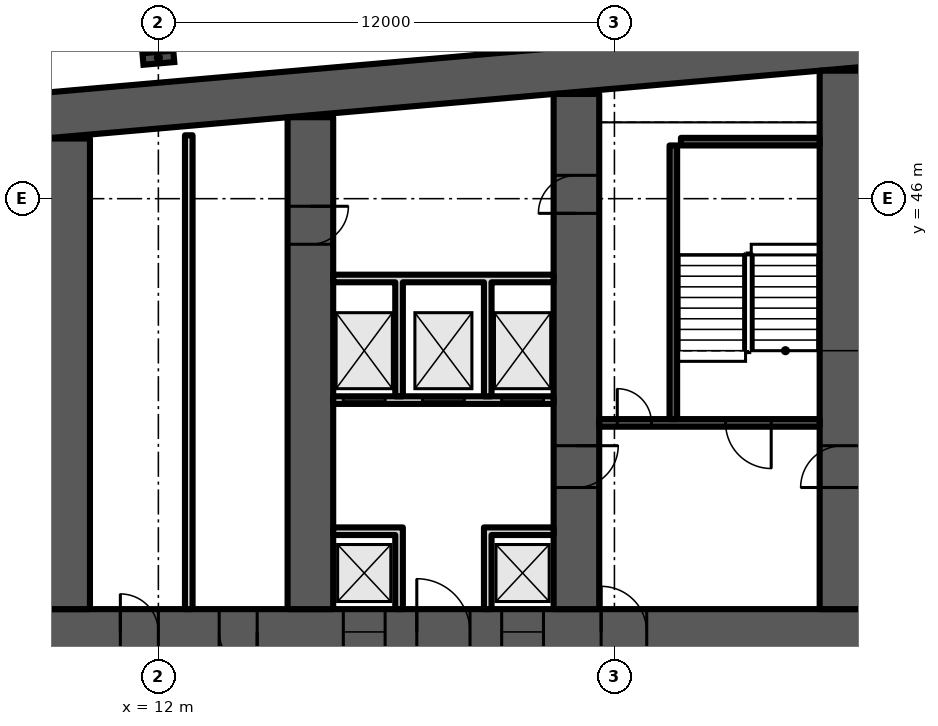
"""IFC4 building model, lengths in metres.
Left out: names, types, materials, properties, quantities, classifications, styles, units other than length and angle.
Written with IfcOpenShell. Run it as: python <this file> out.ifc"""

import sys

from ifc_helpers import new_model, si_unit, direction, frame, frame_2d, origin, origin_2d, place, context, subcontext, project, spatial, polyline, rectangle, i_section, outline, extrude, element, fill, save


model = new_model("IFC4")
c1 = context("Model", 3, precision=1e-05, world=origin(), true_north=direction((0.0, 1.0)))
c2 = subcontext(c1, "Body", "Model", "MODEL_VIEW")
j1 = project(units=[si_unit("LENGTHUNIT", "METRE"), si_unit("PLANEANGLEUNIT", "RADIAN")], contexts=[c1])
p1 = place(None, origin())
s1 = spatial("IfcSite", under=j1, at=p1, CompositionType="ELEMENT")
p2 = place(p1, origin())
s2 = spatial("IfcBuilding", under=s1, at=p2, CompositionType="ELEMENT")
p3 = place(p2, frame((0.0, 0.0, 88.3)))
s3 = spatial("IfcBuildingStorey", under=s2, at=p3, CompositionType="ELEMENT", Elevation=88.3)
p4 = place(p3, frame((0.0, 0.0, -0.0)))
e1 = element("IfcWall", 1, at=p4, inside=s3, PredefinedType="SHEAR", context=c2, shape_type="SweptSolid", body=[
    extrude(outline(polyline([(9.0, 47.583), (37.0, 50.032), (65.0, 47.583), (65.0, 48.787), (37.0, 51.237), (9.0, 48.787), (9.0, 47.583)])), origin(), (0.0, 0.0, 1.0), 3.6),
])
p5 = place(p3, frame((9.0, 34.6, 0.0), z_axis=(0.0, 0.0, 1.0), x_axis=(1.0, 0.0, 0.0)))
e2 = element("IfcWall", 2, at=p5, inside=s3, PredefinedType="SHEAR", context=c2, shape_type="SweptSolid", body=[
    extrude(rectangle(XDim=56.0, YDim=1.2, at=frame_2d((28.0, 0.0))), origin(), (0.0, 0.0, 1.0), 3.6),
])
p6 = place(p5, frame((2.0, 0.0, 0.0)))
e3 = element("IfcOpeningElement", 3, at=p6, cuts=e2, PredefinedType="OPENING", context=c2, shape_type="SweptSolid", body=[
    extrude(rectangle(XDim=1.0, YDim=2.1, at=frame_2d((0.5, 1.05))), frame((0.0, 0.61, 0.0), z_axis=(0.0, -1.0, 0.0), x_axis=(1.0, 0.0, 0.0)), (0.0, 0.0, 1.0), 1.22),
])
p7 = place(p5, frame((4.6, 0.0, 0.0)))
e4 = element("IfcOpeningElement", 4, at=p7, cuts=e2, PredefinedType="OPENING", context=c2, shape_type="SweptSolid", body=[
    extrude(rectangle(XDim=1.0, YDim=2.1, at=frame_2d((0.5, 1.05))), frame((0.0, 0.61, 0.0), z_axis=(0.0, -1.0, 0.0), x_axis=(1.0, 0.0, 0.0)), (0.0, 0.0, 1.0), 1.22),
])
p8 = place(p5, frame((7.867, 0.0, 0.0)))
e5 = element("IfcOpeningElement", 5, at=p8, cuts=e2, PredefinedType="OPENING", context=c2, shape_type="SweptSolid", body=[
    extrude(rectangle(XDim=1.1, YDim=2.1, at=frame_2d((0.55, 1.05))), frame((0.0, 0.61, 0.0), z_axis=(0.0, -1.0, 0.0), x_axis=(1.0, 0.0, 0.0)), (0.0, 0.0, 1.0), 1.22),
])
p9 = place(p5, frame((12.033, 0.0, 0.0)))
e6 = element("IfcOpeningElement", 6, at=p9, cuts=e2, PredefinedType="OPENING", context=c2, shape_type="SweptSolid", body=[
    extrude(rectangle(XDim=1.1, YDim=2.1, at=frame_2d((0.55, 1.05))), frame((0.0, 0.61, 0.0), z_axis=(0.0, -1.0, 0.0), x_axis=(1.0, 0.0, 0.0)), (0.0, 0.0, 1.0), 1.22),
])
p10 = place(p5, frame((9.8, 0.0, 0.0)))
e7 = element("IfcOpeningElement", 7, at=p10, cuts=e2, PredefinedType="OPENING", context=c2, shape_type="SweptSolid", body=[
    extrude(rectangle(XDim=1.4, YDim=2.1, at=frame_2d((0.7, 1.05))), frame((0.0, 0.61, 0.0), z_axis=(0.0, -1.0, 0.0), x_axis=(1.0, 0.0, 0.0)), (0.0, 0.0, 1.0), 1.22),
])
p11 = place(p5, frame((14.65, 0.0, 0.0)))
e8 = element("IfcOpeningElement", 8, at=p11, cuts=e2, PredefinedType="OPENING", context=c2, shape_type="SweptSolid", body=[
    extrude(rectangle(XDim=1.2, YDim=2.1, at=frame_2d((0.6, 1.05))), frame((0.0, 0.61, 0.0), z_axis=(0.0, -1.0, 0.0), x_axis=(1.0, 0.0, 0.0)), (0.0, 0.0, 1.0), 1.22),
])
p12 = place(p5, frame((21.867, 0.0, 0.0)))
e9 = element("IfcOpeningElement", 9, at=p12, cuts=e2, PredefinedType="OPENING", context=c2, shape_type="SweptSolid", body=[
    extrude(rectangle(XDim=1.1, YDim=2.1, at=frame_2d((0.55, 1.05))), frame((0.0, 0.61, 0.0), z_axis=(0.0, -1.0, 0.0), x_axis=(1.0, 0.0, 0.0)), (0.0, 0.0, 1.0), 1.22),
])
p13 = place(p5, frame((26.033, 0.0, 0.0)))
e10 = element("IfcOpeningElement", 10, at=p13, cuts=e2, PredefinedType="OPENING", context=c2, shape_type="SweptSolid", body=[
    extrude(rectangle(XDim=1.1, YDim=2.1, at=frame_2d((0.55, 1.05))), frame((0.0, 0.61, 0.0), z_axis=(0.0, -1.0, 0.0), x_axis=(1.0, 0.0, 0.0)), (0.0, 0.0, 1.0), 1.22),
])
p14 = place(p5, frame((23.8, 0.0, 0.0)))
e11 = element("IfcOpeningElement", 11, at=p14, cuts=e2, PredefinedType="OPENING", context=c2, shape_type="SweptSolid", body=[
    extrude(rectangle(XDim=1.4, YDim=2.1, at=frame_2d((0.7, 1.05))), frame((0.0, 0.61, 0.0), z_axis=(0.0, -1.0, 0.0), x_axis=(1.0, 0.0, 0.0)), (0.0, 0.0, 1.0), 1.22),
])
p15 = place(p5, frame((28.867, 0.0, 0.0)))
e12 = element("IfcOpeningElement", 12, at=p15, cuts=e2, PredefinedType="OPENING", context=c2, shape_type="SweptSolid", body=[
    extrude(rectangle(XDim=1.1, YDim=2.1, at=frame_2d((0.55, 1.05))), frame((0.0, 0.61, 0.0), z_axis=(0.0, -1.0, 0.0), x_axis=(1.0, 0.0, 0.0)), (0.0, 0.0, 1.0), 1.22),
])
p16 = place(p5, frame((33.033, 0.0, 0.0)))
e13 = element("IfcOpeningElement", 13, at=p16, cuts=e2, PredefinedType="OPENING", context=c2, shape_type="SweptSolid", body=[
    extrude(rectangle(XDim=1.1, YDim=2.1, at=frame_2d((0.55, 1.05))), frame((0.0, 0.61, 0.0), z_axis=(0.0, -1.0, 0.0), x_axis=(1.0, 0.0, 0.0)), (0.0, 0.0, 1.0), 1.22),
])
p17 = place(p5, frame((40.15, 0.0, 0.0)))
e14 = element("IfcOpeningElement", 14, at=p17, cuts=e2, PredefinedType="OPENING", context=c2, shape_type="SweptSolid", body=[
    extrude(rectangle(XDim=1.2, YDim=2.1, at=frame_2d((0.6, 1.05))), frame((0.0, 0.61, 0.0), z_axis=(0.0, -1.0, 0.0), x_axis=(1.0, 0.0, 0.0)), (0.0, 0.0, 1.0), 1.22),
])
p18 = place(p5, frame((44.8, 0.0, 0.0)))
e15 = element("IfcOpeningElement", 15, at=p18, cuts=e2, PredefinedType="OPENING", context=c2, shape_type="SweptSolid", body=[
    extrude(rectangle(XDim=1.4, YDim=2.1, at=frame_2d((0.7, 1.05))), frame((0.0, 0.61, 0.0), z_axis=(0.0, -1.0, 0.0), x_axis=(1.0, 0.0, 0.0)), (0.0, 0.0, 1.0), 1.22),
])
p19 = place(p5, frame((49.867, 0.0, 0.0)))
e16 = element("IfcOpeningElement", 16, at=p19, cuts=e2, PredefinedType="OPENING", context=c2, shape_type="SweptSolid", body=[
    extrude(rectangle(XDim=1.1, YDim=2.1, at=frame_2d((0.55, 1.05))), frame((0.0, 0.61, 0.0), z_axis=(0.0, -1.0, 0.0), x_axis=(1.0, 0.0, 0.0)), (0.0, 0.0, 1.0), 1.22),
])
p20 = place(p5, frame((53.5, 0.0, 0.0)))
e17 = element("IfcOpeningElement", 17, at=p20, cuts=e2, PredefinedType="OPENING", context=c2, shape_type="SweptSolid", body=[
    extrude(rectangle(XDim=1.1, YDim=2.1, at=frame_2d((0.55, 1.05))), frame((0.0, 0.61, 0.0), z_axis=(0.0, -1.0, 0.0), x_axis=(1.0, 0.0, 0.0)), (0.0, 0.0, 1.0), 1.22),
])
p21 = place(p5, frame((51.567, 0.0, 0.0)))
e18 = element("IfcOpeningElement", 18, at=p21, cuts=e2, PredefinedType="OPENING", context=c2, shape_type="SweptSolid", body=[
    extrude(rectangle(XDim=1.4, YDim=2.1, at=frame_2d((0.7, 1.05))), frame((0.0, 0.61, 0.0), z_axis=(0.0, -1.0, 0.0), x_axis=(1.0, 0.0, 0.0)), (0.0, 0.0, 1.0), 1.22),
])
p22 = place(p3, frame((9.6, 35.2, 0.0), z_axis=(0.0, 0.0, 1.0), x_axis=(0.0, 1.0, 0.0)))
e19 = element("IfcWall", 19, at=p22, inside=s3, PredefinedType="SHEAR", context=c2, shape_type="SweptSolid", body=[
    extrude(rectangle(XDim=12.383, YDim=1.2, at=frame_2d((6.191, 0.0))), origin(), (0.0, 0.0, 1.0), 3.6),
])
p23 = place(p3, frame((16.0, 35.2, 0.0), z_axis=(0.0, 0.0, 1.0), x_axis=(0.0, 1.0, 0.0)))
e20 = element("IfcWall", 20, at=p23, inside=s3, PredefinedType="SHEAR", context=c2, shape_type="SweptSolid", body=[
    extrude(rectangle(XDim=12.943, YDim=1.2, at=frame_2d((6.471, 0.0))), origin(), (0.0, 0.0, 1.0), 3.6),
])
p24 = place(p23, frame((9.6, 0.0, 0.0)))
e21 = element("IfcOpeningElement", 21, at=p24, cuts=e20, PredefinedType="OPENING", context=c2, shape_type="SweptSolid", body=[
    extrude(rectangle(XDim=1.0, YDim=2.1, at=frame_2d((0.5, 1.05))), frame((0.0, 0.61, 0.0), z_axis=(0.0, -1.0, 0.0), x_axis=(1.0, 0.0, 0.0)), (0.0, 0.0, 1.0), 1.22),
])
p25 = place(p3, frame((23.0, 35.2, 0.0), z_axis=(0.0, 0.0, 1.0), x_axis=(0.0, 1.0, 0.0)))
e22 = element("IfcWall", 22, at=p25, inside=s3, PredefinedType="SHEAR", context=c2, shape_type="SweptSolid", body=[
    extrude(rectangle(XDim=13.555, YDim=1.2, at=frame_2d((6.778, 0.0))), origin(), (0.0, 0.0, 1.0), 3.6),
])
p26 = place(p25, frame((10.414, 0.0, 0.0)))
e23 = element("IfcOpeningElement", 23, at=p26, cuts=e22, PredefinedType="OPENING", context=c2, shape_type="SweptSolid", body=[
    extrude(rectangle(XDim=1.0, YDim=2.1, at=frame_2d((0.5, 1.05))), frame((0.0, 0.61, 0.0), z_axis=(0.0, -1.0, 0.0), x_axis=(1.0, 0.0, 0.0)), (0.0, 0.0, 1.0), 1.22),
])
p27 = place(p25, frame((3.2, 0.0, 0.0)))
e24 = element("IfcOpeningElement", 24, at=p27, cuts=e22, PredefinedType="OPENING", context=c2, shape_type="SweptSolid", body=[
    extrude(rectangle(XDim=1.1, YDim=2.1, at=frame_2d((0.55, 1.05))), frame((0.0, 0.61, 0.0), z_axis=(0.0, -1.0, 0.0), x_axis=(1.0, 0.0, 0.0)), (0.0, 0.0, 1.0), 1.22),
])
p28 = place(p3, frame((30.0, 35.2, 0.0), z_axis=(0.0, 0.0, 1.0), x_axis=(0.0, 1.0, 0.0)))
e25 = element("IfcWall", 25, at=p28, inside=s3, PredefinedType="SHEAR", context=c2, shape_type="SweptSolid", body=[
    extrude(rectangle(XDim=14.168, YDim=1.2, at=frame_2d((7.084, 0.0))), origin(), (0.0, 0.0, 1.0), 3.6),
])
p29 = place(p28, frame((3.2, 0.0, 0.0)))
e26 = element("IfcOpeningElement", 26, at=p29, cuts=e25, PredefinedType="OPENING", context=c2, shape_type="SweptSolid", body=[
    extrude(rectangle(XDim=1.1, YDim=2.1, at=frame_2d((0.55, 1.05))), frame((0.0, 0.61, 0.0), z_axis=(0.0, -1.0, 0.0), x_axis=(1.0, 0.0, 0.0)), (0.0, 0.0, 1.0), 1.22),
])
p30 = place(p3, frame((12.0, 49.71, 0.0), z_axis=(0.0, 0.0, 1.0), x_axis=(-0.087156, 0.996197, 0.0)))
e27 = element("IfcColumn", 27, at=p30, inside=s3, PredefinedType="COLUMN", context=c2, shape_type="SweptSolid", body=[
    extrude(i_section(OverallWidth=0.303, OverallDepth=0.814, WebThickness=0.021, FlangeThickness=0.04, FilletRadius=0.03, at=origin_2d()), origin(), (0.0, 0.0, 1.0), 3.6),
])
p31 = place(p3, frame((12.8, 35.2, 0.0), z_axis=(0.0, 0.0, 1.0), x_axis=(0.0, 1.0, 0.0)))
e28 = element("IfcWall", 28, at=p31, inside=s3, PredefinedType="PARTITIONING", context=c2, shape_type="SweptSolid", body=[
    extrude(rectangle(XDim=12.468, YDim=0.2, at=frame_2d((6.234, 0.0))), origin(), (0.0, 0.0, 1.0), 3.15),
])
p32 = place(p3, frame((16.6, 40.7, 0.0), z_axis=(0.0, 0.0, 1.0), x_axis=(1.0, 0.0, 0.0)))
e29 = element("IfcWall", 29, at=p32, inside=s3, PredefinedType="PARTITIONING", context=c2, shape_type="SweptSolid", body=[
    extrude(rectangle(XDim=5.8, YDim=0.2, at=frame_2d((2.9, 0.0))), origin(), (0.0, 0.0, 1.0), 3.15),
])
p33 = place(p32, frame((0.267, 0.0, 0.0)))
e30 = element("IfcOpeningElement", 30, at=p33, cuts=e29, PredefinedType="OPENING", context=c2, shape_type="SweptSolid", body=[
    extrude(rectangle(XDim=1.1, YDim=2.1, at=frame_2d((0.55, 1.05))), frame((0.0, 0.11, 0.0), z_axis=(0.0, -1.0, 0.0), x_axis=(1.0, 0.0, 0.0)), (0.0, 0.0, 1.0), 0.22),
])
p34 = place(p32, frame((2.35, 0.0, 0.0)))
e31 = element("IfcOpeningElement", 31, at=p34, cuts=e29, PredefinedType="OPENING", context=c2, shape_type="SweptSolid", body=[
    extrude(rectangle(XDim=1.1, YDim=2.1, at=frame_2d((0.55, 1.05))), frame((0.0, 0.11, 0.0), z_axis=(0.0, -1.0, 0.0), x_axis=(1.0, 0.0, 0.0)), (0.0, 0.0, 1.0), 0.22),
])
p35 = place(p32, frame((4.433, 0.0, 0.0)))
e32 = element("IfcOpeningElement", 32, at=p35, cuts=e29, PredefinedType="OPENING", context=c2, shape_type="SweptSolid", body=[
    extrude(rectangle(XDim=1.1, YDim=2.1, at=frame_2d((0.55, 1.05))), frame((0.0, 0.11, 0.0), z_axis=(0.0, -1.0, 0.0), x_axis=(1.0, 0.0, 0.0)), (0.0, 0.0, 1.0), 0.22),
])
p36 = place(p3, frame((0.0, 0.0, -0.0)))
e33 = element("IfcWall", 33, at=p36, inside=s3, PredefinedType="PARTITIONING", context=c2, shape_type="SweptSolid", body=[
    extrude(outline(polyline([(18.233, 37.15), (16.6, 37.15), (16.6, 37.35), (18.233, 37.35), (18.433, 37.35), (18.433, 35.2), (18.233, 35.2), (18.233, 37.15)])), origin(), (0.0, 0.0, 1.0), 3.15),
])
p37 = place(p3, frame((0.0, 0.0, -0.0)))
e34 = element("IfcWall", 34, at=p37, inside=s3, PredefinedType="PARTITIONING", context=c2, shape_type="SweptSolid", body=[
    extrude(outline(polyline([(20.567, 37.35), (20.767, 37.35), (22.4, 37.35), (22.4, 37.15), (20.767, 37.15), (20.767, 35.2), (20.567, 35.2), (20.567, 37.35)])), origin(), (0.0, 0.0, 1.0), 3.15),
])
p38 = place(p3, frame((0.0, 0.0, -0.0)))
e35 = element("IfcWall", 35, at=p38, inside=s3, PredefinedType="PARTITIONING", context=c2, shape_type="SweptSolid", body=[
    extrude(outline(polyline([(18.433, 40.8), (18.233, 40.8), (18.233, 43.8), (16.6, 43.8), (16.6, 44.0), (22.4, 44.0), (22.4, 43.8), (20.767, 43.8), (20.767, 40.8), (20.567, 40.8), (20.567, 43.8), (18.433, 43.8), (18.433, 40.8)])), origin(), (0.0, 0.0, 1.0), 3.15),
])
p39 = place(p3, frame((23.6, 40.1, 0.0), z_axis=(0.0, 0.0, 1.0), x_axis=(1.0, 0.0, 0.0)))
e36 = element("IfcWall", 36, at=p39, inside=s3, PredefinedType="SHEAR", context=c2, shape_type="SweptSolid", body=[
    extrude(rectangle(XDim=5.8, YDim=0.2, at=frame_2d((2.9, 0.0))), origin(), (0.0, 0.0, 1.0), 3.15),
])
p40 = place(p39, frame((3.325, 0.0, 0.0)))
e37 = element("IfcOpeningElement", 37, at=p40, cuts=e36, PredefinedType="OPENING", context=c2, shape_type="SweptSolid", body=[
    extrude(rectangle(XDim=1.2, YDim=2.1, at=frame_2d((0.6, 1.05))), frame((0.0, 0.11, 0.0), z_axis=(0.0, -1.0, 0.0), x_axis=(1.0, 0.0, 0.0)), (0.0, 0.0, 1.0), 0.22),
])
p41 = place(p39, frame((0.475, 0.0, 0.0)))
e38 = element("IfcOpeningElement", 38, at=p41, cuts=e36, PredefinedType="OPENING", context=c2, shape_type="SweptSolid", body=[
    extrude(rectangle(XDim=0.9, YDim=2.1, at=frame_2d((0.45, 1.05))), frame((0.0, 0.11, 0.0), z_axis=(0.0, -1.0, 0.0), x_axis=(1.0, 0.0, 0.0)), (0.0, 0.0, 1.0), 0.22),
])
p42 = place(p3, frame((25.55, 40.2, 0.0), z_axis=(0.0, 0.0, 1.0), x_axis=(0.0, 1.0, 0.0)))
e39 = element("IfcWall", 39, at=p42, inside=s3, PredefinedType="SHEAR", context=c2, shape_type="SweptSolid", body=[
    extrude(rectangle(XDim=7.2, YDim=0.2, at=frame_2d((3.6, 0.0))), origin(), (0.0, 0.0, 1.0), 3.15),
])
p43 = place(p3, frame((25.75, 47.5, 0.0), z_axis=(0.0, 0.0, 1.0), x_axis=(1.0, 0.0, 0.0)))
e40 = element("IfcWall", 40, at=p43, inside=s3, PredefinedType="SHEAR", context=c2, shape_type="SweptSolid", body=[
    extrude(rectangle(XDim=3.65, YDim=0.2, at=frame_2d((1.825, 0.0))), origin(), (0.0, 0.0, 1.0), 3.15),
])
p44 = place(p6, origin())
e41 = element("IfcDoor", 41, at=p44, inside=s3, OperationType="SINGLE_SWING_LEFT", PredefinedType="DOOR", context=c2, shape_type="SweptSolid", body=[
    extrude(rectangle(XDim=1.0, YDim=2.1, at=frame_2d((0.5, 1.05))), frame((0.0, 0.6, 0.0), z_axis=(0.0, -1.0, 0.0), x_axis=(1.0, 0.0, 0.0)), (0.0, 0.0, 1.0), 1.199),
])
fill(e3, e41)
p45 = place(p7, origin())
e42 = element("IfcDoor", 42, at=p45, inside=s3, OperationType="SINGLE_SWING_RIGHT", PredefinedType="DOOR", context=c2, shape_type="SweptSolid", body=[
    extrude(rectangle(XDim=1.0, YDim=2.1, at=frame_2d((0.5, 1.05))), frame((0.0, 0.6, 0.0), z_axis=(0.0, -1.0, 0.0), x_axis=(1.0, 0.0, 0.0)), (0.0, 0.0, 1.0), 1.199),
])
fill(e4, e42)
p46 = place(p8, origin())
e43 = element("IfcDoor", 43, at=p46, inside=s3, OperationType="DOUBLE_DOOR_SLIDING", PredefinedType="DOOR", context=c2, shape_type="SweptSolid", body=[
    extrude(rectangle(XDim=1.1, YDim=2.1, at=frame_2d((0.55, 1.05))), frame((0.0, 0.025, 0.0), z_axis=(0.0, -1.0, 0.0), x_axis=(1.0, 0.0, 0.0)), (0.0, 0.0, 1.0), 0.05),
])
fill(e5, e43)
p47 = place(p9, origin())
e44 = element("IfcDoor", 44, at=p47, inside=s3, OperationType="DOUBLE_DOOR_SLIDING", PredefinedType="DOOR", context=c2, shape_type="SweptSolid", body=[
    extrude(rectangle(XDim=1.1, YDim=2.1, at=frame_2d((0.55, 1.05))), frame((0.0, 0.025, 0.0), z_axis=(0.0, -1.0, 0.0), x_axis=(1.0, 0.0, 0.0)), (0.0, 0.0, 1.0), 0.05),
])
fill(e6, e44)
p48 = place(p10, origin())
e45 = element("IfcDoor", 45, at=p48, inside=s3, OperationType="DOUBLE_DOOR_SINGLE_SWING", PredefinedType="DOOR", context=c2, shape_type="SweptSolid", body=[
    extrude(rectangle(XDim=1.4, YDim=2.1, at=frame_2d((0.7, 1.05))), frame((0.0, 0.025, 0.0), z_axis=(0.0, -1.0, 0.0), x_axis=(1.0, 0.0, 0.0)), (0.0, 0.0, 1.0), 0.05),
])
fill(e7, e45)
p49 = place(p33, origin())
e46 = element("IfcDoor", 46, at=p49, inside=s3, OperationType="DOUBLE_DOOR_SLIDING", PredefinedType="DOOR", context=c2, shape_type="SweptSolid", body=[
    extrude(rectangle(XDim=1.1, YDim=2.1, at=frame_2d((0.55, 1.05))), frame((0.0, 0.025, 0.0), z_axis=(0.0, -1.0, 0.0), x_axis=(1.0, 0.0, 0.0)), (0.0, 0.0, 1.0), 0.05),
])
fill(e30, e46)
p50 = place(p34, origin())
e47 = element("IfcDoor", 47, at=p50, inside=s3, OperationType="DOUBLE_DOOR_SLIDING", PredefinedType="DOOR", context=c2, shape_type="SweptSolid", body=[
    extrude(rectangle(XDim=1.1, YDim=2.1, at=frame_2d((0.55, 1.05))), frame((0.0, 0.025, 0.0), z_axis=(0.0, -1.0, 0.0), x_axis=(1.0, 0.0, 0.0)), (0.0, 0.0, 1.0), 0.05),
])
fill(e31, e47)
p51 = place(p35, origin())
e48 = element("IfcDoor", 48, at=p51, inside=s3, OperationType="DOUBLE_DOOR_SLIDING", PredefinedType="DOOR", context=c2, shape_type="SweptSolid", body=[
    extrude(rectangle(XDim=1.1, YDim=2.1, at=frame_2d((0.55, 1.05))), frame((0.0, 0.025, 0.0), z_axis=(0.0, -1.0, 0.0), x_axis=(1.0, 0.0, 0.0)), (0.0, 0.0, 1.0), 0.05),
])
fill(e32, e48)
p52 = place(p26, origin())
e49 = element("IfcDoor", 49, at=p52, inside=s3, OperationType="SINGLE_SWING_LEFT", PredefinedType="DOOR", context=c2, shape_type="SweptSolid", body=[
    extrude(rectangle(XDim=1.0, YDim=2.1, at=frame_2d((0.5, 1.05))), frame((0.0, 0.6, 0.0), z_axis=(0.0, -1.0, 0.0), x_axis=(1.0, 0.0, 0.0)), (0.0, 0.0, 1.0), 1.199),
])
fill(e23, e49)
p53 = place(p40, origin())
e50 = element("IfcDoor", 50, at=p53, inside=s3, OperationType="SINGLE_SWING_RIGHT", PredefinedType="DOOR", context=c2, shape_type="SweptSolid", body=[
    extrude(rectangle(XDim=1.2, YDim=2.1, at=frame_2d((0.6, 1.05))), frame((0.0, 0.025, 0.0), z_axis=(0.0, -1.0, 0.0), x_axis=(1.0, 0.0, 0.0)), (0.0, 0.0, 1.0), 0.05),
])
fill(e37, e50)
p54 = place(p41, origin())
e51 = element("IfcDoor", 51, at=p54, inside=s3, OperationType="SINGLE_SWING_LEFT", PredefinedType="DOOR", context=c2, shape_type="SweptSolid", body=[
    extrude(rectangle(XDim=0.9, YDim=2.1, at=frame_2d((0.45, 1.05))), frame((0.0, 0.025, 0.0), z_axis=(0.0, -1.0, 0.0), x_axis=(1.0, 0.0, 0.0)), (0.0, 0.0, 1.0), 0.05),
])
fill(e38, e51)
p55 = place(p11, origin())
e52 = element("IfcDoor", 52, at=p55, inside=s3, OperationType="SINGLE_SWING_LEFT", PredefinedType="DOOR", context=c2, shape_type="SweptSolid", body=[
    extrude(rectangle(XDim=1.2, YDim=2.1, at=frame_2d((0.6, 1.05))), frame((0.0, 0.025, 0.0), z_axis=(0.0, -1.0, 0.0), x_axis=(1.0, 0.0, 0.0)), (0.0, 0.0, 1.0), 0.05),
])
fill(e8, e52)
p56 = place(p24, origin())
e53 = element("IfcDoor", 53, at=p56, inside=s3, OperationType="SINGLE_SWING_RIGHT", PredefinedType="DOOR", context=c2, shape_type="SweptSolid", body=[
    extrude(rectangle(XDim=1.0, YDim=2.1, at=frame_2d((0.5, 1.05))), frame((0.0, 0.6, 0.0), z_axis=(0.0, -1.0, 0.0), x_axis=(1.0, 0.0, 0.0)), (0.0, 0.0, 1.0), 1.199),
])
fill(e21, e53)
p57 = place(p27, origin())
e54 = element("IfcDoor", 54, at=p57, inside=s3, OperationType="SINGLE_SWING_RIGHT", PredefinedType="DOOR", context=c2, shape_type="SweptSolid", body=[
    extrude(rectangle(XDim=1.1, YDim=2.1, at=frame_2d((0.55, 1.05))), frame((0.0, 0.025, 0.0), z_axis=(0.0, -1.0, 0.0), x_axis=(1.0, 0.0, 0.0)), (0.0, 0.0, 1.0), 0.05),
])
fill(e24, e54)
p58 = place(p29, origin())
e55 = element("IfcDoor", 55, at=p58, inside=s3, OperationType="SINGLE_SWING_LEFT", PredefinedType="DOOR", context=c2, shape_type="SweptSolid", body=[
    extrude(rectangle(XDim=1.1, YDim=2.1, at=frame_2d((0.55, 1.05))), frame((0.0, 0.025, 0.0), z_axis=(0.0, -1.0, 0.0), x_axis=(1.0, 0.0, 0.0)), (0.0, 0.0, 1.0), 0.05),
])
fill(e26, e55)
save(model, sys.argv[1])
